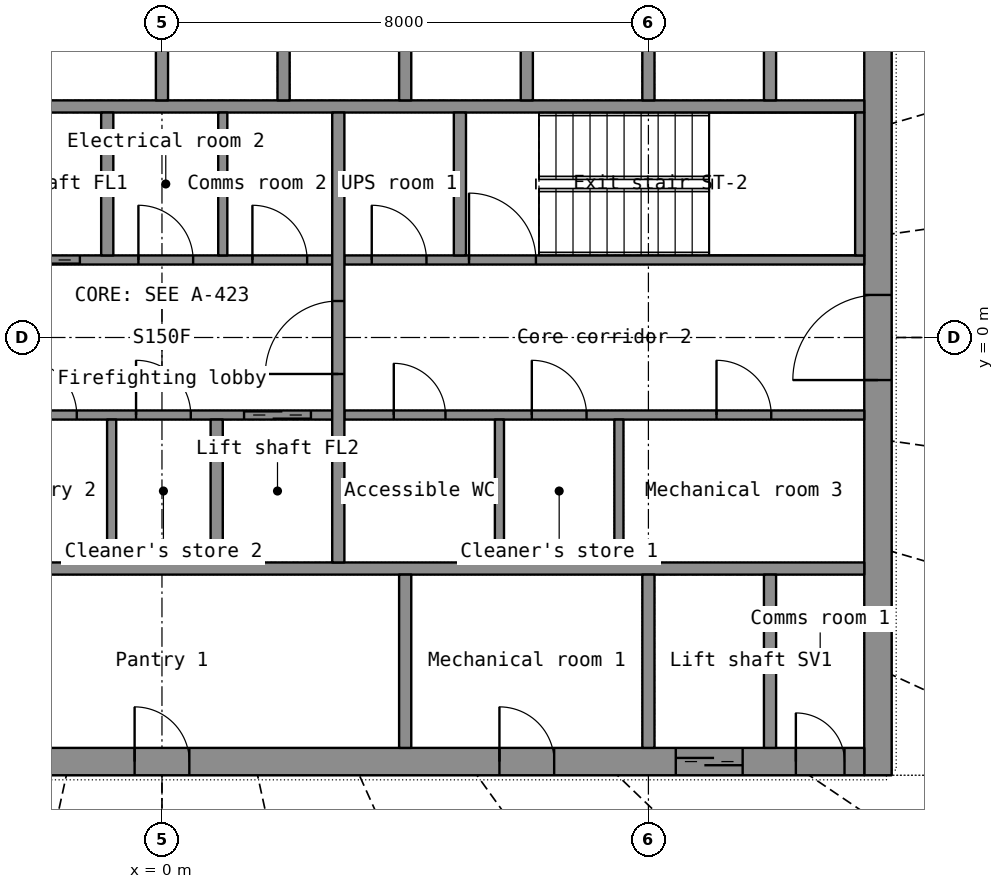
"""IFC4 building model, lengths in metres.
Left out: names, types, materials, properties, quantities, classifications, styles, units other than length and angle.
Written with IfcOpenShell. Run it as: python <this file> out.ifc"""

import sys

from ifc_helpers import new_model, si_unit, direction, frame, frame_2d, origin, place, context, subcontext, project, spatial, rectangle, extrude, element, fill, save


model = new_model("IFC4")
c1 = context("Model", 3, precision=1e-05, world=origin(), true_north=direction((0.0, 1.0)))
c2 = subcontext(c1, "Body", "Model", "MODEL_VIEW")
j1 = project(units=[si_unit("LENGTHUNIT", "METRE"), si_unit("PLANEANGLEUNIT", "RADIAN")], contexts=[c1])
p1 = place(None, origin())
s1 = spatial("IfcSite", under=j1, at=p1, CompositionType="ELEMENT")
p2 = place(p1, origin())
s2 = spatial("IfcBuilding", under=s1, at=p2, CompositionType="ELEMENT")
p3 = place(p2, frame((0.0, 0.0, 175.6)))
s3 = spatial("IfcBuildingStorey", under=s2, at=p3, CompositionType="ELEMENT", Elevation=175.6)
p4 = place(p3, frame((11.775, -7.2, 0.0), z_axis=(0.0, 0.0, 1.0), x_axis=(0.0, 1.0, 0.0)))
e1 = element("IfcWall", 1, at=p4, inside=s3, PredefinedType="SHEAR", context=c2, shape_type="SweptSolid", body=[
    extrude(rectangle(XDim=14.4, YDim=0.45, at=frame_2d((7.2, 0.0))), origin(), (0.0, 0.0, 1.0), 3.3),
])
p5 = place(p4, frame((6.5, 0.0, 0.0)))
e2 = element("IfcOpeningElement", 2, at=p5, cuts=e1, PredefinedType="OPENING", context=c2, shape_type="SweptSolid", body=[
    extrude(rectangle(XDim=1.4, YDim=2.2, at=frame_2d((0.7, 1.1))), frame((0.0, 0.235, 0.0), z_axis=(0.0, -1.0, 0.0), x_axis=(1.0, 0.0, 0.0)), (0.0, 0.0, 1.0), 0.47),
])
p6 = place(p3, frame((-11.55, -6.975, 0.0), z_axis=(0.0, 0.0, 1.0), x_axis=(1.0, 0.0, 0.0)))
e3 = element("IfcWall", 3, at=p6, inside=s3, PredefinedType="SHEAR", context=c2, shape_type="SweptSolid", body=[
    extrude(rectangle(XDim=23.1, YDim=0.45, at=frame_2d((11.55, 0.0))), origin(), (0.0, 0.0, 1.0), 3.3),
])
p7 = place(p6, frame((20.0, 0.0, 0.0)))
e4 = element("IfcOpeningElement", 4, at=p7, cuts=e3, PredefinedType="OPENING", context=c2, shape_type="SweptSolid", body=[
    extrude(rectangle(XDim=1.1, YDim=2.2, at=frame_2d((0.55, 1.1))), frame((0.0, 0.235, 0.0), z_axis=(0.0, -1.0, 0.0), x_axis=(1.0, 0.0, 0.0)), (0.0, 0.0, 1.0), 0.47),
])
p8 = place(p6, frame((4.1, 0.0, 0.0)))
e5 = element("IfcOpeningElement", 5, at=p8, cuts=e3, PredefinedType="OPENING", context=c2, shape_type="SweptSolid", body=[
    extrude(rectangle(XDim=0.9, YDim=2.1, at=frame_2d((0.45, 1.05))), frame((0.0, 0.235, 0.0), z_axis=(0.0, -1.0, 0.0), x_axis=(1.0, 0.0, 0.0)), (0.0, 0.0, 1.0), 0.47),
])
p9 = place(p6, frame((11.1, 0.0, 0.0)))
e6 = element("IfcOpeningElement", 6, at=p9, cuts=e3, PredefinedType="OPENING", context=c2, shape_type="SweptSolid", body=[
    extrude(rectangle(XDim=0.9, YDim=2.1, at=frame_2d((0.45, 1.05))), frame((0.0, 0.235, 0.0), z_axis=(0.0, -1.0, 0.0), x_axis=(1.0, 0.0, 0.0)), (0.0, 0.0, 1.0), 0.47),
])
p10 = place(p6, frame((17.1, 0.0, 0.0)))
e7 = element("IfcOpeningElement", 7, at=p10, cuts=e3, PredefinedType="OPENING", context=c2, shape_type="SweptSolid", body=[
    extrude(rectangle(XDim=0.9, YDim=2.1, at=frame_2d((0.45, 1.05))), frame((0.0, 0.235, 0.0), z_axis=(0.0, -1.0, 0.0), x_axis=(1.0, 0.0, 0.0)), (0.0, 0.0, 1.0), 0.47),
])
p11 = place(p6, frame((0.325, 0.0, 0.0)))
e8 = element("IfcOpeningElement", 8, at=p11, cuts=e3, PredefinedType="OPENING", context=c2, shape_type="SweptSolid", body=[
    extrude(rectangle(XDim=0.8, YDim=2.05, at=frame_2d((0.4, 1.025))), frame((0.0, 0.235, 0.0), z_axis=(0.0, -1.0, 0.0), x_axis=(1.0, 0.0, 0.0)), (0.0, 0.0, 1.0), 0.47),
])
p12 = place(p6, frame((21.975, 0.0, 0.0)))
e9 = element("IfcOpeningElement", 9, at=p12, cuts=e3, PredefinedType="OPENING", context=c2, shape_type="SweptSolid", body=[
    extrude(rectangle(XDim=0.8, YDim=2.05, at=frame_2d((0.4, 1.025))), frame((0.0, 0.235, 0.0), z_axis=(0.0, -1.0, 0.0), x_axis=(1.0, 0.0, 0.0)), (0.0, 0.0, 1.0), 0.47),
])
for number, where, z_axis, x_axis in (
    (10, (-11.55, -3.8, 0.0), (0.0, 0.0, 1.0), (1.0, 0.0, 0.0)),
    (11, (-11.55, 3.8, 0.0), (0.0, 0.0, 1.0), (1.0, 0.0, 0.0)),
):
    element("IfcWall", number, at=place(p3, frame(where, z_axis=z_axis, x_axis=x_axis)), inside=s3, PredefinedType="SHEAR", context=c2, shape_type="SweptSolid", body=[
        extrude(rectangle(XDim=23.1, YDim=0.2, at=frame_2d((11.55, 0.0))), origin(), (0.0, 0.0, 1.0), 3.3),
    ])
for number, where, z_axis, x_axis in (
    (12, (8.0, -6.75, 0.0), (0.0, 0.0, 1.0), (0.0, 1.0, 0.0)),
    (13, (10.0, -6.75, 0.0), (0.0, 0.0, 1.0), (0.0, 1.0, 0.0)),
):
    element("IfcWall", number, at=place(p3, frame(where, z_axis=z_axis, x_axis=x_axis)), inside=s3, PredefinedType="SHEAR", context=c2, shape_type="SweptSolid", body=[
        extrude(rectangle(XDim=2.85, YDim=0.2, at=frame_2d((1.425, 0.0))), origin(), (0.0, 0.0, 1.0), 3.3),
    ])
p13 = place(p3, frame((4.0, -6.75, 0.0), z_axis=(0.0, 0.0, 1.0), x_axis=(0.0, 1.0, 0.0)))
e14 = element("IfcWall", 14, at=p13, inside=s3, PredefinedType="PARTITIONING", context=c2, shape_type="SweptSolid", body=[
    extrude(rectangle(XDim=2.85, YDim=0.2, at=frame_2d((1.425, 0.0))), origin(), (0.0, 0.0, 1.0), 3.3),
])
for number, where, z_axis, x_axis in (
    (15, (0.0, 3.9, 0.0), (0.0, 0.0, 1.0), (0.0, 1.0, 0.0)),
    (16, (2.0, 3.9, 0.0), (0.0, 0.0, 1.0), (0.0, 1.0, 0.0)),
    (17, (4.0, 3.9, 0.0), (0.0, 0.0, 1.0), (0.0, 1.0, 0.0)),
    (18, (6.0, 3.9, 0.0), (0.0, 0.0, 1.0), (0.0, 1.0, 0.0)),
    (19, (8.0, 3.9, 0.0), (0.0, 0.0, 1.0), (0.0, 1.0, 0.0)),
    (20, (10.0, 3.9, 0.0), (0.0, 0.0, 1.0), (0.0, 1.0, 0.0)),
):
    element("IfcWall", number, at=place(p3, frame(where, z_axis=z_axis, x_axis=x_axis)), inside=s3, PredefinedType="SHEAR", context=c2, shape_type="SweptSolid", body=[
        extrude(rectangle(XDim=2.85, YDim=0.2, at=frame_2d((1.425, 0.0))), origin(), (0.0, 0.0, 1.0), 3.3),
    ])
p14 = place(p3, frame((-2.8, -1.275, 0.0), z_axis=(0.0, 0.0, 1.0), x_axis=(1.0, 0.0, 0.0)))
e21 = element("IfcWall", 21, at=p14, inside=s3, PredefinedType="SHEAR", context=c2, shape_type="SweptSolid", body=[
    extrude(rectangle(XDim=5.6, YDim=0.15, at=frame_2d((2.8, 0.0))), origin(), (0.0, 0.0, 1.0), 3.3),
])
p15 = place(p14, frame((4.15, 0.0, 0.0)))
e22 = element("IfcOpeningElement", 22, at=p15, cuts=e21, PredefinedType="OPENING", context=c2, shape_type="SweptSolid", body=[
    extrude(rectangle(XDim=1.1, YDim=2.2, at=frame_2d((0.55, 1.1))), frame((0.0, 0.085, 0.0), z_axis=(0.0, -1.0, 0.0), x_axis=(1.0, 0.0, 0.0)), (0.0, 0.0, 1.0), 0.17),
])
p16 = place(p14, frame((0.499, 0.0, 0.0)))
e23 = element("IfcOpeningElement", 23, at=p16, cuts=e21, PredefinedType="OPENING", context=c2, shape_type="SweptSolid", body=[
    extrude(rectangle(XDim=0.9, YDim=2.1, at=frame_2d((0.45, 1.05))), frame((0.0, 0.085, 0.0), z_axis=(0.0, -1.0, 0.0), x_axis=(1.0, 0.0, 0.0)), (0.0, 0.0, 1.0), 0.17),
])
p17 = place(p14, frame((2.374, 0.0, 0.0)))
e24 = element("IfcOpeningElement", 24, at=p17, cuts=e21, PredefinedType="OPENING", context=c2, shape_type="SweptSolid", body=[
    extrude(rectangle(XDim=0.9, YDim=2.1, at=frame_2d((0.45, 1.05))), frame((0.0, 0.085, 0.0), z_axis=(0.0, -1.0, 0.0), x_axis=(1.0, 0.0, 0.0)), (0.0, 0.0, 1.0), 0.17),
])
p18 = place(p3, frame((3.0, -1.275, 0.0), z_axis=(0.0, 0.0, 1.0), x_axis=(1.0, 0.0, 0.0)))
e25 = element("IfcWall", 25, at=p18, inside=s3, PredefinedType="PARTITIONING", context=c2, shape_type="SweptSolid", body=[
    extrude(rectangle(XDim=8.55, YDim=0.15, at=frame_2d((4.275, 0.0))), origin(), (0.0, 0.0, 1.0), 3.3),
])
p19 = place(p18, frame((0.812, 0.0, 0.0)))
e26 = element("IfcOpeningElement", 26, at=p19, cuts=e25, PredefinedType="OPENING", context=c2, shape_type="SweptSolid", body=[
    extrude(rectangle(XDim=0.85, YDim=2.1, at=frame_2d((0.425, 1.05))), frame((0.0, 0.085, 0.0), z_axis=(0.0, -1.0, 0.0), x_axis=(1.0, 0.0, 0.0)), (0.0, 0.0, 1.0), 0.17),
])
p20 = place(p18, frame((3.083, 0.0, 0.0)))
e27 = element("IfcOpeningElement", 27, at=p20, cuts=e25, PredefinedType="OPENING", context=c2, shape_type="SweptSolid", body=[
    extrude(rectangle(XDim=0.9, YDim=2.1, at=frame_2d((0.45, 1.05))), frame((0.0, 0.085, 0.0), z_axis=(0.0, -1.0, 0.0), x_axis=(1.0, 0.0, 0.0)), (0.0, 0.0, 1.0), 0.17),
])
p21 = place(p18, frame((6.12, 0.0, 0.0)))
e28 = element("IfcOpeningElement", 28, at=p21, cuts=e25, PredefinedType="OPENING", context=c2, shape_type="SweptSolid", body=[
    extrude(rectangle(XDim=0.9, YDim=2.1, at=frame_2d((0.45, 1.05))), frame((0.0, 0.085, 0.0), z_axis=(0.0, -1.0, 0.0), x_axis=(1.0, 0.0, 0.0)), (0.0, 0.0, 1.0), 0.17),
])
p22 = place(p3, frame((-2.8, 1.275, 0.0), z_axis=(0.0, 0.0, 1.0), x_axis=(1.0, 0.0, 0.0)))
e29 = element("IfcWall", 29, at=p22, inside=s3, PredefinedType="SHEAR", context=c2, shape_type="SweptSolid", body=[
    extrude(rectangle(XDim=5.6, YDim=0.15, at=frame_2d((2.8, 0.0))), origin(), (0.0, 0.0, 1.0), 3.3),
])
p23 = place(p22, frame((0.35, 0.0, 0.0)))
e30 = element("IfcOpeningElement", 30, at=p23, cuts=e29, PredefinedType="OPENING", context=c2, shape_type="SweptSolid", body=[
    extrude(rectangle(XDim=1.1, YDim=2.2, at=frame_2d((0.55, 1.1))), frame((0.0, 0.085, 0.0), z_axis=(0.0, -1.0, 0.0), x_axis=(1.0, 0.0, 0.0)), (0.0, 0.0, 1.0), 0.17),
])
p24 = place(p22, frame((2.413, 0.0, 0.0)))
e31 = element("IfcOpeningElement", 31, at=p24, cuts=e29, PredefinedType="OPENING", context=c2, shape_type="SweptSolid", body=[
    extrude(rectangle(XDim=0.9, YDim=2.1, at=frame_2d((0.45, 1.05))), frame((0.0, 0.085, 0.0), z_axis=(0.0, -1.0, 0.0), x_axis=(1.0, 0.0, 0.0)), (0.0, 0.0, 1.0), 0.17),
])
p25 = place(p22, frame((4.288, 0.0, 0.0)))
e32 = element("IfcOpeningElement", 32, at=p25, cuts=e29, PredefinedType="OPENING", context=c2, shape_type="SweptSolid", body=[
    extrude(rectangle(XDim=0.9, YDim=2.1, at=frame_2d((0.45, 1.05))), frame((0.0, 0.085, 0.0), z_axis=(0.0, -1.0, 0.0), x_axis=(1.0, 0.0, 0.0)), (0.0, 0.0, 1.0), 0.17),
])
p26 = place(p3, frame((3.0, 1.275, 0.0), z_axis=(0.0, 0.0, 1.0), x_axis=(1.0, 0.0, 0.0)))
e33 = element("IfcWall", 33, at=p26, inside=s3, PredefinedType="SHEAR", context=c2, shape_type="SweptSolid", body=[
    extrude(rectangle(XDim=8.55, YDim=0.15, at=frame_2d((4.275, 0.0))), origin(), (0.0, 0.0, 1.0), 3.3),
])
p27 = place(p26, frame((2.05, 0.0, 0.0)))
e34 = element("IfcOpeningElement", 34, at=p27, cuts=e33, PredefinedType="OPENING", context=c2, shape_type="SweptSolid", body=[
    extrude(rectangle(XDim=1.1, YDim=2.15, at=frame_2d((0.55, 1.075))), frame((0.0, 0.085, 0.0), z_axis=(0.0, -1.0, 0.0), x_axis=(1.0, 0.0, 0.0)), (0.0, 0.0, 1.0), 0.17),
])
p28 = place(p26, frame((0.45, 0.0, 0.0)))
e35 = element("IfcOpeningElement", 35, at=p28, cuts=e33, PredefinedType="OPENING", context=c2, shape_type="SweptSolid", body=[
    extrude(rectangle(XDim=0.9, YDim=2.1, at=frame_2d((0.45, 1.05))), frame((0.0, 0.085, 0.0), z_axis=(0.0, -1.0, 0.0), x_axis=(1.0, 0.0, 0.0)), (0.0, 0.0, 1.0), 0.17),
])
p29 = place(p3, frame((2.9, -3.7, 0.0), z_axis=(0.0, 0.0, 1.0), x_axis=(0.0, 1.0, 0.0)))
e36 = element("IfcWall", 36, at=p29, inside=s3, PredefinedType="SHEAR", context=c2, shape_type="SweptSolid", body=[
    extrude(rectangle(XDim=7.4, YDim=0.2, at=frame_2d((3.7, 0.0))), origin(), (0.0, 0.0, 1.0), 3.3),
])
p30 = place(p29, frame((3.1, 0.0, 0.0)))
e37 = element("IfcOpeningElement", 37, at=p30, cuts=e36, PredefinedType="OPENING", context=c2, shape_type="SweptSolid", body=[
    extrude(rectangle(XDim=1.2, YDim=2.2, at=frame_2d((0.6, 1.1))), frame((0.0, 0.11, 0.0), z_axis=(0.0, -1.0, 0.0), x_axis=(1.0, 0.0, 0.0)), (0.0, 0.0, 1.0), 0.22),
])
for number, where, z_axis, x_axis in (
    (38, (-0.9, 1.35, 0.0), (0.0, 0.0, 1.0), (0.0, 1.0, 0.0)),
    (39, (0.9, -3.7, 0.0), (0.0, 0.0, 1.0), (0.0, 1.0, 0.0)),
):
    element("IfcWall", number, at=place(p3, frame(where, z_axis=z_axis, x_axis=x_axis)), inside=s3, PredefinedType="SHEAR", context=c2, shape_type="SweptSolid", body=[
        extrude(rectangle(XDim=2.35, YDim=0.2, at=frame_2d((1.175, 0.0))), origin(), (0.0, 0.0, 1.0), 3.3),
    ])
p31 = place(p3, frame((11.475, 1.35, 0.0), z_axis=(0.0, 0.0, 1.0), x_axis=(0.0, 1.0, 0.0)))
e40 = element("IfcWall", 40, at=p31, inside=s3, PredefinedType="SHEAR", context=c2, shape_type="SweptSolid", body=[
    extrude(rectangle(XDim=2.35, YDim=0.15, at=frame_2d((1.175, 0.0))), origin(), (0.0, 0.0, 1.0), 3.3),
])
p32 = place(p3, frame((4.9, 1.35, 0.0), z_axis=(0.0, 0.0, 1.0), x_axis=(0.0, 1.0, 0.0)))
e41 = element("IfcWall", 41, at=p32, inside=s3, PredefinedType="SHEAR", context=c2, shape_type="SweptSolid", body=[
    extrude(rectangle(XDim=2.35, YDim=0.2, at=frame_2d((1.175, 0.0))), origin(), (0.0, 0.0, 1.0), 3.3),
])
for number, where, z_axis, x_axis in (
    (42, (5.55, -3.7, 0.0), (0.0, 0.0, 1.0), (0.0, 1.0, 0.0)),
    (43, (7.515, -3.7, 0.0), (0.0, 0.0, 1.0), (0.0, 1.0, 0.0)),
    (44, (1.0, 1.35, 0.0), (0.0, 0.0, 1.0), (0.0, 1.0, 0.0)),
    (45, (-0.827, -3.7, 0.0), (0.0, 0.0, 1.0), (0.0, 1.0, 0.0)),
):
    element("IfcWall", number, at=place(p3, frame(where, z_axis=z_axis, x_axis=x_axis)), inside=s3, PredefinedType="PARTITIONING", context=c2, shape_type="SweptSolid", body=[
        extrude(rectangle(XDim=2.35, YDim=0.15, at=frame_2d((1.175, 0.0))), origin(), (0.0, 0.0, 1.0), 3.3),
    ])
p33 = place(p7, origin())
e46 = element("IfcDoor", 46, at=p33, inside=s3, OperationType="DOUBLE_DOOR_SLIDING", PredefinedType="DOOR", context=c2, shape_type="SweptSolid", body=[
    extrude(rectangle(XDim=1.1, YDim=2.2, at=frame_2d((0.55, 1.1))), frame((0.0, 0.025, 0.0), z_axis=(0.0, -1.0, 0.0), x_axis=(1.0, 0.0, 0.0)), (0.0, 0.0, 1.0), 0.05),
])
fill(e4, e46)
p34 = place(p9, origin())
e47 = element("IfcDoor", 47, at=p34, inside=s3, OperationType="SINGLE_SWING_LEFT", PredefinedType="DOOR", context=c2, shape_type="SweptSolid", body=[
    extrude(rectangle(XDim=0.9, YDim=2.1, at=frame_2d((0.45, 1.05))), frame((0.0, 0.025, 0.0), z_axis=(0.0, -1.0, 0.0), x_axis=(1.0, 0.0, 0.0)), (0.0, 0.0, 1.0), 0.05),
])
fill(e6, e47)
p35 = place(p10, origin())
e48 = element("IfcDoor", 48, at=p35, inside=s3, OperationType="SINGLE_SWING_LEFT", PredefinedType="DOOR", context=c2, shape_type="SweptSolid", body=[
    extrude(rectangle(XDim=0.9, YDim=2.1, at=frame_2d((0.45, 1.05))), frame((0.0, 0.025, 0.0), z_axis=(0.0, -1.0, 0.0), x_axis=(1.0, 0.0, 0.0)), (0.0, 0.0, 1.0), 0.05),
])
fill(e7, e48)
p36 = place(p12, origin())
e49 = element("IfcDoor", 49, at=p36, inside=s3, OperationType="SINGLE_SWING_LEFT", PredefinedType="DOOR", context=c2, shape_type="SweptSolid", body=[
    extrude(rectangle(XDim=0.8, YDim=2.05, at=frame_2d((0.4, 1.025))), frame((0.0, 0.025, 0.0), z_axis=(0.0, -1.0, 0.0), x_axis=(1.0, 0.0, 0.0)), (0.0, 0.0, 1.0), 0.05),
])
fill(e9, e49)
p37 = place(p5, origin())
e50 = element("IfcDoor", 50, at=p37, inside=s3, OperationType="DOUBLE_DOOR_SINGLE_SWING", PredefinedType="DOOR", context=c2, shape_type="SweptSolid", body=[
    extrude(rectangle(XDim=1.4, YDim=2.2, at=frame_2d((0.7, 1.1))), frame((0.0, 0.025, 0.0), z_axis=(0.0, -1.0, 0.0), x_axis=(1.0, 0.0, 0.0)), (0.0, 0.0, 1.0), 0.05),
])
fill(e2, e50)
p38 = place(p30, origin())
e51 = element("IfcDoor", 51, at=p38, inside=s3, OperationType="SINGLE_SWING_LEFT", PredefinedType="DOOR", context=c2, shape_type="SweptSolid", body=[
    extrude(rectangle(XDim=1.2, YDim=2.2, at=frame_2d((0.6, 1.1))), frame((0.0, 0.025, 0.0), z_axis=(0.0, -1.0, 0.0), x_axis=(1.0, 0.0, 0.0)), (0.0, 0.0, 1.0), 0.05),
])
fill(e37, e51)
p39 = place(p23, origin())
e52 = element("IfcDoor", 52, at=p39, inside=s3, OperationType="DOUBLE_DOOR_SLIDING", PredefinedType="DOOR", context=c2, shape_type="SweptSolid", body=[
    extrude(rectangle(XDim=1.1, YDim=2.2, at=frame_2d((0.55, 1.1))), frame((0.0, 0.025, 0.0), z_axis=(0.0, -1.0, 0.0), x_axis=(1.0, 0.0, 0.0)), (0.0, 0.0, 1.0), 0.05),
])
fill(e30, e52)
p40 = place(p15, origin())
e53 = element("IfcDoor", 53, at=p40, inside=s3, OperationType="DOUBLE_DOOR_SLIDING", PredefinedType="DOOR", context=c2, shape_type="SweptSolid", body=[
    extrude(rectangle(XDim=1.1, YDim=2.2, at=frame_2d((0.55, 1.1))), frame((0.0, 0.025, 0.0), z_axis=(0.0, -1.0, 0.0), x_axis=(1.0, 0.0, 0.0)), (0.0, 0.0, 1.0), 0.05),
])
fill(e22, e53)
p41 = place(p27, origin())
e54 = element("IfcDoor", 54, at=p41, inside=s3, OperationType="SINGLE_SWING_LEFT", PredefinedType="DOOR", context=c2, shape_type="SweptSolid", body=[
    extrude(rectangle(XDim=1.1, YDim=2.15, at=frame_2d((0.55, 1.075))), frame((0.0, 0.025, 0.0), z_axis=(0.0, -1.0, 0.0), x_axis=(1.0, 0.0, 0.0)), (0.0, 0.0, 1.0), 0.05),
])
fill(e34, e54)
p42 = place(p19, origin())
e55 = element("IfcDoor", 55, at=p42, inside=s3, OperationType="SINGLE_SWING_LEFT", PredefinedType="DOOR", context=c2, shape_type="SweptSolid", body=[
    extrude(rectangle(XDim=0.85, YDim=2.1, at=frame_2d((0.425, 1.05))), frame((0.0, 0.025, 0.0), z_axis=(0.0, -1.0, 0.0), x_axis=(1.0, 0.0, 0.0)), (0.0, 0.0, 1.0), 0.05),
])
fill(e26, e55)
p43 = place(p20, origin())
e56 = element("IfcDoor", 56, at=p43, inside=s3, OperationType="SINGLE_SWING_LEFT", PredefinedType="DOOR", context=c2, shape_type="SweptSolid", body=[
    extrude(rectangle(XDim=0.9, YDim=2.1, at=frame_2d((0.45, 1.05))), frame((0.0, 0.025, 0.0), z_axis=(0.0, -1.0, 0.0), x_axis=(1.0, 0.0, 0.0)), (0.0, 0.0, 1.0), 0.05),
])
fill(e27, e56)
p44 = place(p21, origin())
e57 = element("IfcDoor", 57, at=p44, inside=s3, OperationType="SINGLE_SWING_LEFT", PredefinedType="DOOR", context=c2, shape_type="SweptSolid", body=[
    extrude(rectangle(XDim=0.9, YDim=2.1, at=frame_2d((0.45, 1.05))), frame((0.0, 0.025, 0.0), z_axis=(0.0, -1.0, 0.0), x_axis=(1.0, 0.0, 0.0)), (0.0, 0.0, 1.0), 0.05),
])
fill(e28, e57)
p45 = place(p24, origin())
e58 = element("IfcDoor", 58, at=p45, inside=s3, OperationType="SINGLE_SWING_LEFT", PredefinedType="DOOR", context=c2, shape_type="SweptSolid", body=[
    extrude(rectangle(XDim=0.9, YDim=2.1, at=frame_2d((0.45, 1.05))), frame((0.0, 0.025, 0.0), z_axis=(0.0, -1.0, 0.0), x_axis=(1.0, 0.0, 0.0)), (0.0, 0.0, 1.0), 0.05),
])
fill(e31, e58)
p46 = place(p25, origin())
e59 = element("IfcDoor", 59, at=p46, inside=s3, OperationType="SINGLE_SWING_LEFT", PredefinedType="DOOR", context=c2, shape_type="SweptSolid", body=[
    extrude(rectangle(XDim=0.9, YDim=2.1, at=frame_2d((0.45, 1.05))), frame((0.0, 0.025, 0.0), z_axis=(0.0, -1.0, 0.0), x_axis=(1.0, 0.0, 0.0)), (0.0, 0.0, 1.0), 0.05),
])
fill(e32, e59)
p47 = place(p16, origin())
e60 = element("IfcDoor", 60, at=p47, inside=s3, OperationType="SINGLE_SWING_LEFT", PredefinedType="DOOR", context=c2, shape_type="SweptSolid", body=[
    extrude(rectangle(XDim=0.9, YDim=2.1, at=frame_2d((0.45, 1.05))), frame((0.0, 0.025, 0.0), z_axis=(0.0, -1.0, 0.0), x_axis=(1.0, 0.0, 0.0)), (0.0, 0.0, 1.0), 0.05),
])
fill(e23, e60)
p48 = place(p17, origin())
e61 = element("IfcDoor", 61, at=p48, inside=s3, OperationType="SINGLE_SWING_LEFT", PredefinedType="DOOR", context=c2, shape_type="SweptSolid", body=[
    extrude(rectangle(XDim=0.9, YDim=2.1, at=frame_2d((0.45, 1.05))), frame((0.0, 0.025, 0.0), z_axis=(0.0, -1.0, 0.0), x_axis=(1.0, 0.0, 0.0)), (0.0, 0.0, 1.0), 0.05),
])
fill(e24, e61)
p49 = place(p28, origin())
e62 = element("IfcDoor", 62, at=p49, inside=s3, OperationType="SINGLE_SWING_LEFT", PredefinedType="DOOR", context=c2, shape_type="SweptSolid", body=[
    extrude(rectangle(XDim=0.9, YDim=2.1, at=frame_2d((0.45, 1.05))), frame((0.0, 0.025, 0.0), z_axis=(0.0, -1.0, 0.0), x_axis=(1.0, 0.0, 0.0)), (0.0, 0.0, 1.0), 0.05),
])
fill(e35, e62)
save(model, sys.argv[1])
